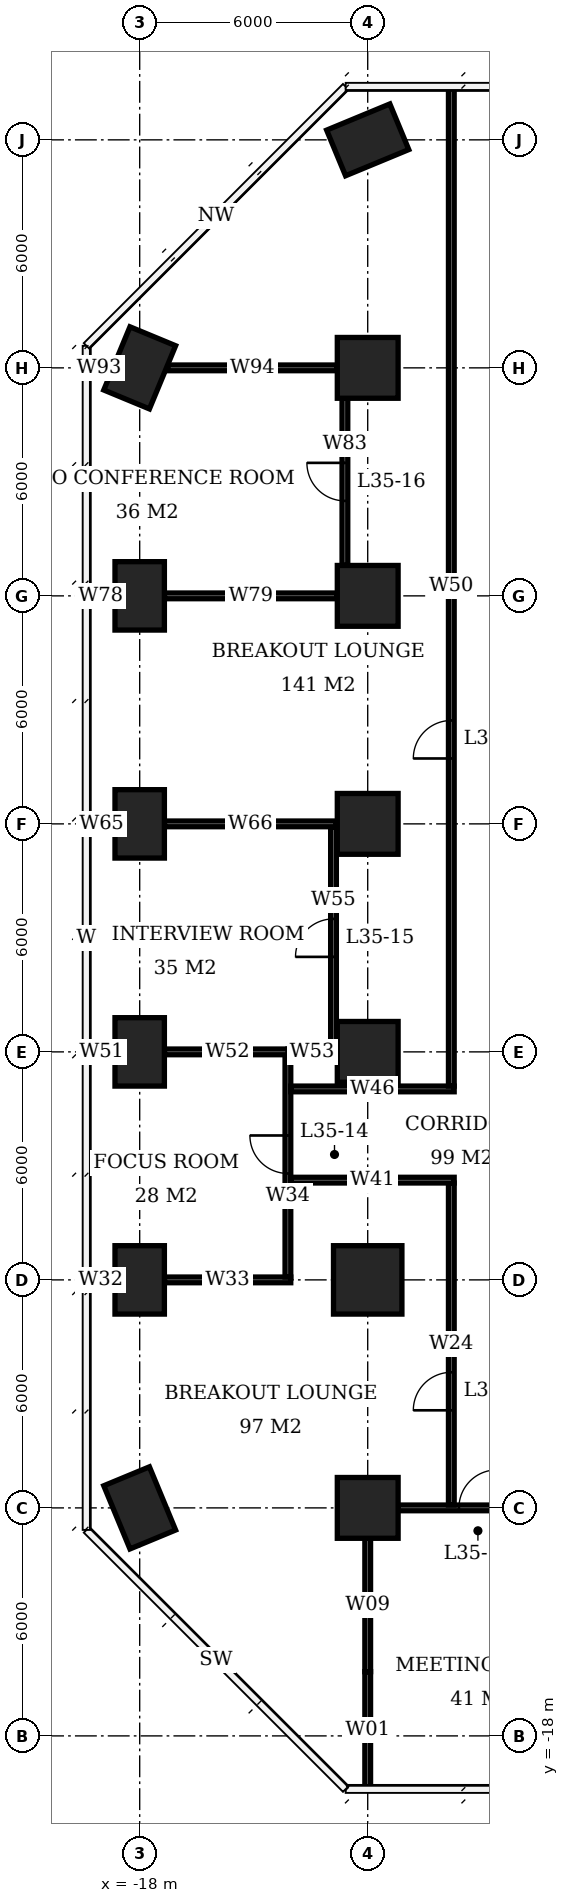
"""IFC4 building model, lengths in metres.
Left out: names, types, materials, properties, quantities, classifications, styles, units other than length and angle.
Written with IfcOpenShell. Run it as: python <this file> out.ifc"""

import sys

from ifc_helpers import new_model, si_unit, direction, frame, frame_2d, origin, origin_2d, place, context, subcontext, project, spatial, rectangle, extrude, element, fill, save


model = new_model("IFC4")
c1 = context("Model", 3, precision=1e-05, world=origin(), true_north=direction((0.0, 1.0)))
c2 = subcontext(c1, "Body", "Model", "MODEL_VIEW")
j1 = project(units=[si_unit("LENGTHUNIT", "METRE"), si_unit("PLANEANGLEUNIT", "RADIAN")], contexts=[c1])
p1 = place(None, origin())
s1 = spatial("IfcSite", under=j1, at=p1, CompositionType="ELEMENT")
p2 = place(p1, origin())
s2 = spatial("IfcBuilding", under=s1, at=p2, CompositionType="ELEMENT")
p3 = place(p2, frame((0.0, 0.0, 144.5)))
s3 = spatial("IfcBuildingStorey", under=s2, at=p3, CompositionType="ELEMENT", Elevation=144.5)
for number, where, z_axis, x_axis in (
    (1, (-18.0, -12.0, 0.0), (0.0, 0.0, 1.0), (-0.383, 0.924, 0.0)),
    (2, (-18.0, -6.0, 0.0), (0.0, 0.0, 1.0), (0.0, 1.0, 0.0)),
    (3, (-18.0, 0.0, 0.0), (0.0, 0.0, 1.0), (0.0, 1.0, 0.0)),
    (4, (-18.0, 6.0, 0.0), (0.0, 0.0, 1.0), (0.0, 1.0, 0.0)),
    (5, (-18.0, 12.0, 0.0), (0.0, 0.0, 1.0), (0.0, 1.0, 0.0)),
    (6, (-18.0, 18.0, 0.0), (0.0, 0.0, 1.0), (0.383, 0.924, 0.0)),
):
    element("IfcColumn", number, at=place(p3, frame(where, z_axis=z_axis, x_axis=x_axis)), inside=s3, PredefinedType="COLUMN", context=c2, shape_type="SweptSolid", body=[
        extrude(rectangle(XDim=1.8, YDim=1.3, at=origin_2d()), origin(), (0.0, 0.0, 1.0), 3.9),
    ])
p4 = place(p3, frame((-12.0, -12.0, 0.0), z_axis=(0.0, 0.0, 1.0), x_axis=(1.0, 0.0, 0.0)))
e7 = element("IfcColumn", 7, at=p4, inside=s3, PredefinedType="COLUMN", context=c2, shape_type="SweptSolid", body=[
    extrude(rectangle(XDim=1.6, YDim=1.6, at=origin_2d()), origin(), (0.0, 0.0, 1.0), 3.9),
])
p5 = place(p3, frame((-12.0, -6.0, 0.0), z_axis=(0.0, 0.0, 1.0), x_axis=(1.0, 0.0, 0.0)))
e8 = element("IfcColumn", 8, at=p5, inside=s3, PredefinedType="COLUMN", context=c2, shape_type="SweptSolid", body=[
    extrude(rectangle(XDim=1.8, YDim=1.8, at=origin_2d()), origin(), (0.0, 0.0, 1.0), 3.9),
])
for number, where, z_axis, x_axis in (
    (9, (-12.0, 0.0, 0.0), (0.0, 0.0, 1.0), (1.0, 0.0, 0.0)),
    (10, (-12.0, 6.0, 0.0), (0.0, 0.0, 1.0), (1.0, 0.0, 0.0)),
    (11, (-12.0, 12.0, 0.0), (0.0, 0.0, 1.0), (1.0, 0.0, 0.0)),
    (12, (-12.0, 18.0, 0.0), (0.0, 0.0, 1.0), (1.0, 0.0, 0.0)),
):
    element("IfcColumn", number, at=place(p3, frame(where, z_axis=z_axis, x_axis=x_axis)), inside=s3, PredefinedType="COLUMN", context=c2, shape_type="SweptSolid", body=[
        extrude(rectangle(XDim=1.6, YDim=1.6, at=origin_2d()), origin(), (0.0, 0.0, 1.0), 3.9),
    ])
p6 = place(p3, frame((-12.0, 24.0, 0.0), z_axis=(0.0, 0.0, 1.0), x_axis=(0.923879532511, 0.382683432365, 0.0)))
e13 = element("IfcColumn", 13, at=p6, inside=s3, PredefinedType="COLUMN", context=c2, shape_type="SweptSolid", body=[
    extrude(rectangle(XDim=1.8, YDim=1.3, at=origin_2d()), origin(), (0.0, 0.0, 1.0), 3.9),
])
p7 = place(p3, frame((-11.2, -12.0, 0.0), z_axis=(0.0, 0.0, 1.0), x_axis=(1.0, 0.0, 0.0)))
e14 = element("IfcWall", 14, at=p7, inside=s3, PredefinedType="PARTITIONING", context=c2, shape_type="SweptSolid", body=[
    extrude(rectangle(XDim=4.2, YDim=0.15, at=frame_2d((2.1, 0.0))), origin(), (0.0, 0.0, 1.0), 3.65),
])
p8 = place(p7, frame((1.6, 0.0, 0.0)))
e15 = element("IfcOpeningElement", 15, at=p8, cuts=e14, PredefinedType="OPENING", context=c2, shape_type="SweptSolid", body=[
    extrude(rectangle(XDim=1.0, YDim=2.1, at=frame_2d((0.5, 1.05))), frame((0.0, 0.085, 0.0), z_axis=(0.0, -1.0, 0.0), x_axis=(1.0, 0.0, 0.0)), (0.0, 0.0, 1.0), 0.17),
])
p9 = place(p3, frame((-19.4, -6.0, 0.0), z_axis=(0.0, 0.0, 1.0), x_axis=(1.0, 0.0, 0.0)))
e16 = element("IfcWall", 16, at=p9, inside=s3, PredefinedType="PARTITIONING", context=c2, shape_type="SweptSolid", body=[
    extrude(rectangle(XDim=0.75, YDim=0.15, at=frame_2d((0.375, 0.0))), origin(), (0.0, 0.0, 1.0), 3.65),
])
p10 = place(p3, frame((-17.35, -6.0, 0.0), z_axis=(0.0, 0.0, 1.0), x_axis=(1.0, 0.0, 0.0)))
e17 = element("IfcWall", 17, at=p10, inside=s3, PredefinedType="PARTITIONING", context=c2, shape_type="SweptSolid", body=[
    extrude(rectangle(XDim=3.325, YDim=0.15, at=frame_2d((1.663, 0.0))), origin(), (0.0, 0.0, 1.0), 3.65),
])
p11 = place(p3, frame((-19.35, 0.0, 0.0), z_axis=(0.0, 0.0, 1.0), x_axis=(1.0, 0.0, 0.0)))
e18 = element("IfcWall", 18, at=p11, inside=s3, PredefinedType="PARTITIONING", context=c2, shape_type="SweptSolid", body=[
    extrude(rectangle(XDim=0.7, YDim=0.15, at=frame_2d((0.35, 0.0))), origin(), (0.0, 0.0, 1.0), 3.65),
])
p12 = place(p3, frame((-17.35, 0.0, 0.0), z_axis=(0.0, 0.0, 1.0), x_axis=(1.0, 0.0, 0.0)))
e19 = element("IfcWall", 19, at=p12, inside=s3, PredefinedType="PARTITIONING", context=c2, shape_type="SweptSolid", body=[
    extrude(rectangle(XDim=3.325, YDim=0.15, at=frame_2d((1.663, 0.0))), origin(), (0.0, 0.0, 1.0), 3.65),
])
p13 = place(p3, frame((-14.1, 0.0, 0.0), z_axis=(0.0, 0.0, 1.0), x_axis=(1.0, 0.0, 0.0)))
e20 = element("IfcWall", 20, at=p13, inside=s3, PredefinedType="PARTITIONING", context=c2, shape_type="SweptSolid", body=[
    extrude(rectangle(XDim=1.275, YDim=0.15, at=frame_2d((0.638, 0.0))), origin(), (0.0, 0.0, 1.0), 3.65),
])
p14 = place(p3, frame((-19.35, 6.0, 0.0), z_axis=(0.0, 0.0, 1.0), x_axis=(1.0, 0.0, 0.0)))
e21 = element("IfcWall", 21, at=p14, inside=s3, PredefinedType="PARTITIONING", context=c2, shape_type="SweptSolid", body=[
    extrude(rectangle(XDim=0.7, YDim=0.15, at=frame_2d((0.35, 0.0))), origin(), (0.0, 0.0, 1.0), 3.65),
])
p15 = place(p3, frame((-17.35, 6.0, 0.0), z_axis=(0.0, 0.0, 1.0), x_axis=(1.0, 0.0, 0.0)))
e22 = element("IfcWall", 22, at=p15, inside=s3, PredefinedType="PARTITIONING", context=c2, shape_type="SweptSolid", body=[
    extrude(rectangle(XDim=4.525, YDim=0.15, at=frame_2d((2.263, 0.0))), origin(), (0.0, 0.0, 1.0), 3.65),
])
p16 = place(p3, frame((-19.4, 12.0, 0.0), z_axis=(0.0, 0.0, 1.0), x_axis=(1.0, 0.0, 0.0)))
e23 = element("IfcWall", 23, at=p16, inside=s3, PredefinedType="PARTITIONING", context=c2, shape_type="SweptSolid", body=[
    extrude(rectangle(XDim=0.75, YDim=0.15, at=frame_2d((0.375, 0.0))), origin(), (0.0, 0.0, 1.0), 3.65),
])
p17 = place(p3, frame((-17.35, 12.0, 0.0), z_axis=(0.0, 0.0, 1.0), x_axis=(1.0, 0.0, 0.0)))
e24 = element("IfcWall", 24, at=p17, inside=s3, PredefinedType="PARTITIONING", context=c2, shape_type="SweptSolid", body=[
    extrude(rectangle(XDim=4.55, YDim=0.15, at=frame_2d((2.275, 0.0))), origin(), (0.0, 0.0, 1.0), 3.65),
])
p18 = place(p3, frame((-19.4, 18.0, 0.0), z_axis=(0.0, 0.0, 1.0), x_axis=(1.0, 0.0, 0.0)))
e25 = element("IfcWall", 25, at=p18, inside=s3, PredefinedType="PARTITIONING", context=c2, shape_type="SweptSolid", body=[
    extrude(rectangle(XDim=0.665, YDim=0.15, at=frame_2d((0.333, 0.0))), origin(), (0.0, 0.0, 1.0), 3.65),
])
p19 = place(p3, frame((-17.265, 18.0, 0.0), z_axis=(0.0, 0.0, 1.0), x_axis=(1.0, 0.0, 0.0)))
e26 = element("IfcWall", 26, at=p19, inside=s3, PredefinedType="PARTITIONING", context=c2, shape_type="SweptSolid", body=[
    extrude(rectangle(XDim=4.465, YDim=0.15, at=frame_2d((2.233, 0.0))), origin(), (0.0, 0.0, 1.0), 3.65),
])
p20 = place(p3, frame((-14.1, -5.925, 0.0), z_axis=(0.0, 0.0, 1.0), x_axis=(0.0, 1.0, 0.0)))
e27 = element("IfcWall", 27, at=p20, inside=s3, PredefinedType="PARTITIONING", context=c2, shape_type="SweptSolid", body=[
    extrude(rectangle(XDim=5.85, YDim=0.15, at=frame_2d((2.925, 0.0))), origin(), (0.0, 0.0, 1.0), 3.65),
])
p21 = place(p20, frame((2.725, 0.0, 0.0)))
e28 = element("IfcOpeningElement", 28, at=p21, cuts=e27, PredefinedType="OPENING", context=c2, shape_type="SweptSolid", body=[
    extrude(rectangle(XDim=1.0, YDim=2.1, at=frame_2d((0.5, 1.05))), frame((0.0, 0.085, 0.0), z_axis=(0.0, -1.0, 0.0), x_axis=(1.0, 0.0, 0.0)), (0.0, 0.0, 1.0), 0.17),
])
p22 = place(p3, frame((-12.9, 0.075, 0.0), z_axis=(0.0, 0.0, 1.0), x_axis=(0.0, 1.0, 0.0)))
e29 = element("IfcWall", 29, at=p22, inside=s3, PredefinedType="PARTITIONING", context=c2, shape_type="SweptSolid", body=[
    extrude(rectangle(XDim=5.85, YDim=0.15, at=frame_2d((2.925, 0.0))), origin(), (0.0, 0.0, 1.0), 3.65),
])
p23 = place(p22, frame((2.425, 0.0, 0.0)))
e30 = element("IfcOpeningElement", 30, at=p23, cuts=e29, PredefinedType="OPENING", context=c2, shape_type="SweptSolid", body=[
    extrude(rectangle(XDim=1.0, YDim=2.1, at=frame_2d((0.5, 1.05))), frame((0.0, 0.085, 0.0), z_axis=(0.0, -1.0, 0.0), x_axis=(1.0, 0.0, 0.0)), (0.0, 0.0, 1.0), 0.17),
])
p24 = place(p3, frame((-12.6, 12.8, 0.0), z_axis=(0.0, 0.0, 1.0), x_axis=(0.0, 1.0, 0.0)))
e31 = element("IfcWall", 31, at=p24, inside=s3, PredefinedType="PARTITIONING", context=c2, shape_type="SweptSolid", body=[
    extrude(rectangle(XDim=4.4, YDim=0.15, at=frame_2d((2.2, 0.0))), origin(), (0.0, 0.0, 1.0), 3.65),
])
p25 = place(p24, frame((1.7, 0.0, 0.0)))
e32 = element("IfcOpeningElement", 32, at=p25, cuts=e31, PredefinedType="OPENING", context=c2, shape_type="SweptSolid", body=[
    extrude(rectangle(XDim=1.0, YDim=2.1, at=frame_2d((0.5, 1.05))), frame((0.0, 0.085, 0.0), z_axis=(0.0, -1.0, 0.0), x_axis=(1.0, 0.0, 0.0)), (0.0, 0.0, 1.0), 0.17),
])
p26 = place(p3, frame((-12.0, -19.4, 0.0), z_axis=(0.0, 0.0, 1.0), x_axis=(0.0, 1.0, 0.0)))
e33 = element("IfcWall", 33, at=p26, inside=s3, PredefinedType="PARTITIONING", context=c2, shape_type="SweptSolid", body=[
    extrude(rectangle(XDim=3.09, YDim=0.15, at=frame_2d((1.545, 0.0))), origin(), (0.0, 0.0, 1.0), 3.65),
])
p27 = place(p3, frame((-12.0, -16.31, 0.0), z_axis=(0.0, 0.0, 1.0), x_axis=(0.0, 1.0, 0.0)))
e34 = element("IfcWall", 34, at=p27, inside=s3, PredefinedType="PARTITIONING", context=c2, shape_type="SweptSolid", body=[
    extrude(rectangle(XDim=3.51, YDim=0.15, at=frame_2d((1.755, 0.0))), origin(), (0.0, 0.0, 1.0), 2.65),
])
for number, where, z_axis, x_axis in (
    (35, (-14.025, -3.375, 0.0), (0.0, 0.0, 1.0), (1.0, 0.0, 0.0)),
    (36, (-14.025, -0.975, 0.0), (0.0, 0.0, 1.0), (1.0, 0.0, 0.0)),
):
    element("IfcWall", number, at=place(p3, frame(where, z_axis=z_axis, x_axis=x_axis)), inside=s3, PredefinedType="PARTITIONING", context=c2, shape_type="SweptSolid", body=[
        extrude(rectangle(XDim=4.3, YDim=0.15, at=frame_2d((2.15, 0.0))), origin(), (0.0, 0.0, 1.0), 3.65),
    ])
p28 = place(p3, frame((-9.8, -11.925, 0.0), z_axis=(0.0, 0.0, 1.0), x_axis=(0.0, 1.0, 0.0)))
e37 = element("IfcWall", 37, at=p28, inside=s3, PredefinedType="PARTITIONING", context=c2, shape_type="SweptSolid", body=[
    extrude(rectangle(XDim=8.475, YDim=0.15, at=frame_2d((4.238, 0.0))), origin(), (0.0, 0.0, 1.0), 3.65),
])
p29 = place(p28, frame((2.493, 0.0, 0.0)))
e38 = element("IfcOpeningElement", 38, at=p29, cuts=e37, PredefinedType="OPENING", context=c2, shape_type="SweptSolid", body=[
    extrude(rectangle(XDim=1.0, YDim=2.1, at=frame_2d((0.5, 1.05))), frame((0.0, 0.085, 0.0), z_axis=(0.0, -1.0, 0.0), x_axis=(1.0, 0.0, 0.0)), (0.0, 0.0, 1.0), 0.17),
])
p30 = place(p3, frame((-9.8, -0.9, 0.0), z_axis=(0.0, 0.0, 1.0), x_axis=(0.0, 1.0, 0.0)))
e39 = element("IfcWall", 39, at=p30, inside=s3, PredefinedType="PARTITIONING", context=c2, shape_type="SweptSolid", body=[
    extrude(rectangle(XDim=26.3, YDim=0.15, at=frame_2d((13.15, 0.0))), origin(), (0.0, 0.0, 1.0), 3.65),
])
p31 = place(p30, frame((8.621, 0.0, 0.0)))
e40 = element("IfcOpeningElement", 40, at=p31, cuts=e39, PredefinedType="OPENING", context=c2, shape_type="SweptSolid", body=[
    extrude(rectangle(XDim=1.0, YDim=2.1, at=frame_2d((0.5, 1.05))), frame((0.0, 0.085, 0.0), z_axis=(0.0, -1.0, 0.0), x_axis=(1.0, 0.0, 0.0)), (0.0, 0.0, 1.0), 0.17),
])
p32 = place(p8, origin())
e41 = element("IfcDoor", 41, at=p32, inside=s3, OperationType="SINGLE_SWING_RIGHT", PredefinedType="DOOR", context=c2, shape_type="SweptSolid", body=[
    extrude(rectangle(XDim=1.0, YDim=2.1, at=frame_2d((0.5, 1.05))), frame((0.0, 0.025, 0.0), z_axis=(0.0, -1.0, 0.0), x_axis=(1.0, 0.0, 0.0)), (0.0, 0.0, 1.0), 0.05),
])
fill(e15, e41)
p33 = place(p21, origin())
e42 = element("IfcDoor", 42, at=p33, inside=s3, OperationType="SINGLE_SWING_RIGHT", PredefinedType="DOOR", context=c2, shape_type="SweptSolid", body=[
    extrude(rectangle(XDim=1.0, YDim=2.1, at=frame_2d((0.5, 1.05))), frame((0.0, 0.025, 0.0), z_axis=(0.0, -1.0, 0.0), x_axis=(1.0, 0.0, 0.0)), (0.0, 0.0, 1.0), 0.05),
])
fill(e28, e42)
p34 = place(p23, origin())
e43 = element("IfcDoor", 43, at=p34, inside=s3, OperationType="SINGLE_SWING_LEFT", PredefinedType="DOOR", context=c2, shape_type="SweptSolid", body=[
    extrude(rectangle(XDim=1.0, YDim=2.1, at=frame_2d((0.5, 1.05))), frame((0.0, 0.025, 0.0), z_axis=(0.0, -1.0, 0.0), x_axis=(1.0, 0.0, 0.0)), (0.0, 0.0, 1.0), 0.05),
])
fill(e30, e43)
p35 = place(p25, origin())
e44 = element("IfcDoor", 44, at=p35, inside=s3, OperationType="SINGLE_SWING_RIGHT", PredefinedType="DOOR", context=c2, shape_type="SweptSolid", body=[
    extrude(rectangle(XDim=1.0, YDim=2.1, at=frame_2d((0.5, 1.05))), frame((0.0, 0.025, 0.0), z_axis=(0.0, -1.0, 0.0), x_axis=(1.0, 0.0, 0.0)), (0.0, 0.0, 1.0), 0.05),
])
fill(e32, e44)
p36 = place(p29, origin())
e45 = element("IfcDoor", 45, at=p36, inside=s3, OperationType="SINGLE_SWING_LEFT", PredefinedType="DOOR", context=c2, shape_type="SweptSolid", body=[
    extrude(rectangle(XDim=1.0, YDim=2.1, at=frame_2d((0.5, 1.05))), frame((0.0, 0.025, 0.0), z_axis=(0.0, -1.0, 0.0), x_axis=(1.0, 0.0, 0.0)), (0.0, 0.0, 1.0), 0.05),
])
fill(e38, e45)
p37 = place(p31, origin())
e46 = element("IfcDoor", 46, at=p37, inside=s3, OperationType="SINGLE_SWING_LEFT", PredefinedType="DOOR", context=c2, shape_type="SweptSolid", body=[
    extrude(rectangle(XDim=1.0, YDim=2.1, at=frame_2d((0.5, 1.05))), frame((0.0, 0.025, 0.0), z_axis=(0.0, -1.0, 0.0), x_axis=(1.0, 0.0, 0.0)), (0.0, 0.0, 1.0), 0.05),
])
fill(e40, e46)
save(model, sys.argv[1])
